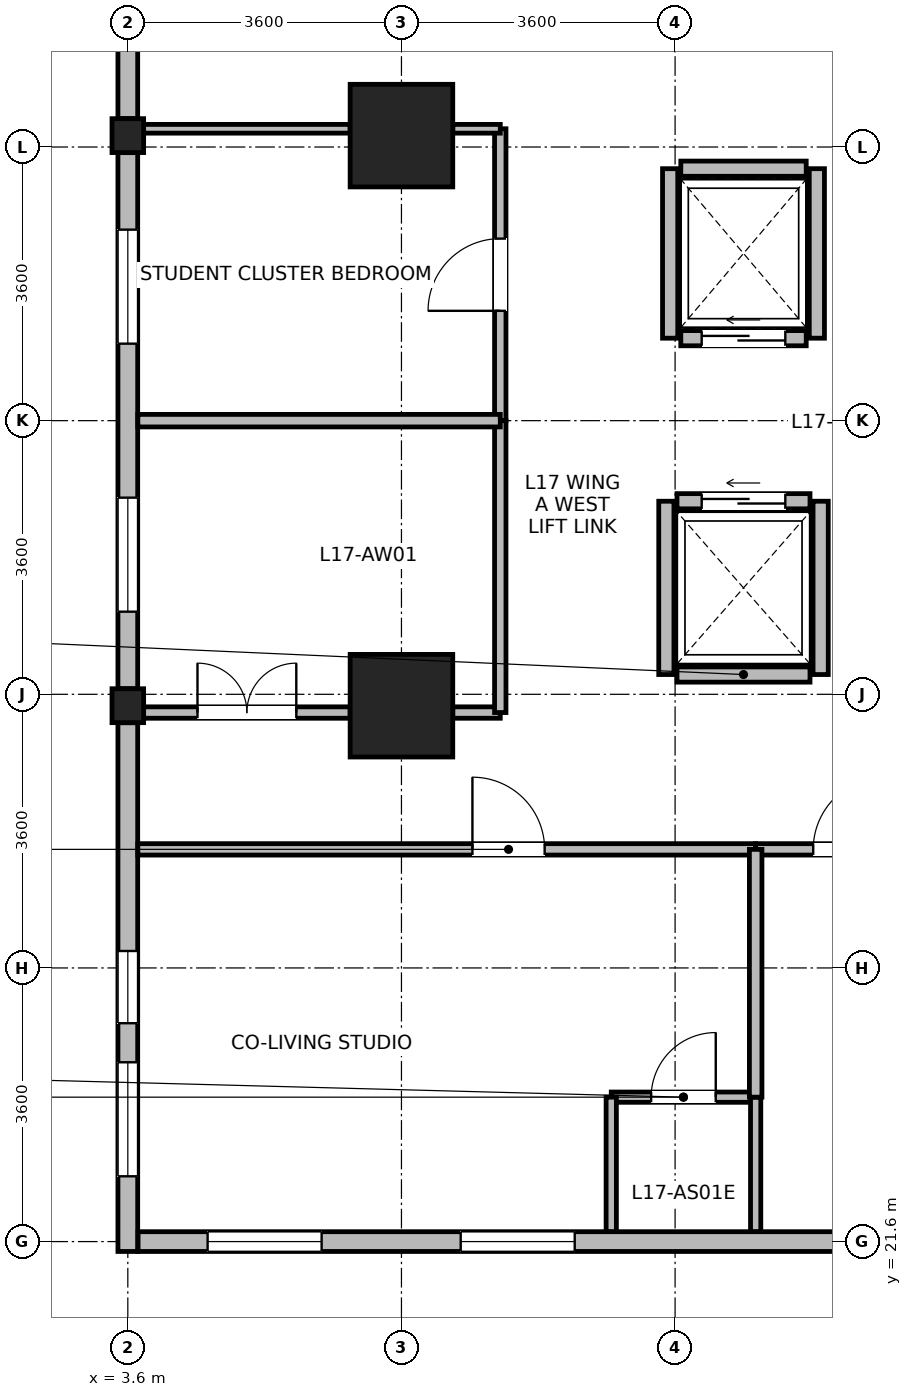
"""IFC4 building model, lengths in metres.
Left out: names, types, materials, properties, quantities, classifications, styles, units other than length and angle.
Written with IfcOpenShell. Run it as: python <this file> out.ifc"""

import sys

from ifc_helpers import new_model, si_unit, direction, frame, frame_2d, origin, origin_2d, place, context, subcontext, project, spatial, rectangle, i_section, extrude, source, transform, mapped, element, fill, save


model = new_model("IFC4")
c1 = context("Model", 3, precision=1e-05, world=origin(), true_north=direction((0.0, 1.0)))
c2 = subcontext(c1, "Body", "Model", "MODEL_VIEW")
j1 = project(units=[si_unit("LENGTHUNIT", "METRE"), si_unit("PLANEANGLEUNIT", "RADIAN")], contexts=[c1])
p1 = place(None, origin())
s1 = spatial("IfcSite", under=j1, at=p1, CompositionType="ELEMENT")
p2 = place(p1, origin())
s2 = spatial("IfcBuilding", under=s1, at=p2, CompositionType="ELEMENT")
p3 = place(p2, frame((0.0, 0.0, 69.7)))
s3 = spatial("IfcBuildingStorey", under=s2, at=p3, CompositionType="ELEMENT", Elevation=69.7)
m1 = source(origin(), c2, "Body", "SweptSolid", [
    extrude(rectangle(XDim=1.35, YDim=1.35, at=origin_2d()), origin(), (0.0, 0.0, 1.0), 3.7),
])
for number, where, z_axis, x_axis in (
    (1, (7.2, 28.65, 0.0), (0.0, 0.0, 1.0), (1.0, 0.0, 0.0)),
    (2, (7.2, 36.15, 0.0), (0.0, 0.0, 1.0), (1.0, 0.0, 0.0)),
):
    element("IfcColumn", number, at=place(p3, frame(where, z_axis=z_axis, x_axis=x_axis)), inside=s3, PredefinedType="COLUMN", context=c2, shape_type="MappedRepresentation", body=[
        mapped(m1, transform((0.0, 0.0, 0.0), x_axis=(1.0, 0.0, 0.0), y_axis=(0.0, 1.0, 0.0), z_axis=(0.0, 0.0, 1.0), scale=1.0)),
    ])
m2 = source(origin(), c2, "Body", "SweptSolid", [
    extrude(i_section(OverallWidth=0.416, OverallDepth=0.446, WebThickness=0.029, FlangeThickness=0.04, FilletRadius=0.015, at=origin_2d()), origin(), (0.0, 0.0, 1.0), 3.7),
])
for number, where, z_axis, x_axis in (
    (3, (3.6, 28.65, 0.0), (0.0, 0.0, 1.0), (1.0, 0.0, 0.0)),
    (4, (3.6, 36.15, 0.0), (0.0, 0.0, 1.0), (1.0, 0.0, 0.0)),
):
    element("IfcColumn", number, at=place(p3, frame(where, z_axis=z_axis, x_axis=x_axis)), inside=s3, PredefinedType="COLUMN", context=c2, shape_type="MappedRepresentation", body=[
        mapped(m2, transform((0.0, 0.0, 0.0), x_axis=(1.0, 0.0, 0.0), y_axis=(0.0, 1.0, 0.0), z_axis=(0.0, 0.0, 1.0), scale=1.0)),
    ])
p4 = place(p3, frame((3.6, 36.374, 0.0), z_axis=(0.0, 0.0, 1.0), x_axis=(0.0, 1.0, 0.0)))
e5 = element("IfcWall", 5, at=p4, inside=s3, PredefinedType="STANDARD", context=c2, shape_type="SweptSolid", body=[
    extrude(rectangle(XDim=3.356, YDim=0.26, at=frame_2d((1.678, 0.0))), origin(), (0.0, 0.0, 1.0), 3.32),
])
p5 = place(p4, frame((0.928, 0.0, 0.85)))
e6 = element("IfcOpeningElement", 6, at=p5, cuts=e5, PredefinedType="OPENING", context=c2, shape_type="SweptSolid", body=[
    extrude(rectangle(XDim=1.5, YDim=1.85, at=frame_2d((0.75, 0.925))), frame((0.0, 0.14, 0.0), z_axis=(0.0, -1.0, 0.0), x_axis=(1.0, 0.0, 0.0)), (0.0, 0.0, 1.0), 0.28),
])
p6 = place(p3, frame((3.6, 28.874, 0.0), z_axis=(0.0, 0.0, 1.0), x_axis=(0.0, 1.0, 0.0)))
e7 = element("IfcWall", 7, at=p6, inside=s3, PredefinedType="STANDARD", context=c2, shape_type="SweptSolid", body=[
    extrude(rectangle(XDim=7.052, YDim=0.26, at=frame_2d((3.526, 0.0))), origin(), (0.0, 0.0, 1.0), 2.82),
])
p7 = place(p6, frame((1.013, 0.0, 0.85)))
e8 = element("IfcOpeningElement", 8, at=p7, cuts=e7, PredefinedType="OPENING", context=c2, shape_type="SweptSolid", body=[
    extrude(rectangle(XDim=1.5, YDim=1.85, at=frame_2d((0.75, 0.925))), frame((0.0, 0.14, 0.0), z_axis=(0.0, -1.0, 0.0), x_axis=(1.0, 0.0, 0.0)), (0.0, 0.0, 1.0), 0.28),
])
p8 = place(p6, frame((4.539, 0.0, 0.85)))
e9 = element("IfcOpeningElement", 9, at=p8, cuts=e7, PredefinedType="OPENING", context=c2, shape_type="SweptSolid", body=[
    extrude(rectangle(XDim=1.5, YDim=1.85, at=frame_2d((0.75, 0.925))), frame((0.0, 0.14, 0.0), z_axis=(0.0, -1.0, 0.0), x_axis=(1.0, 0.0, 0.0)), (0.0, 0.0, 1.0), 0.28),
])
p9 = place(p3, frame((3.6, 21.47, 0.0), z_axis=(0.0, 0.0, 1.0), x_axis=(0.0, 1.0, 0.0)))
e10 = element("IfcWall", 10, at=p9, inside=s3, PredefinedType="STANDARD", context=c2, shape_type="SweptSolid", body=[
    extrude(rectangle(XDim=6.956, YDim=0.26, at=frame_2d((3.478, 0.0))), origin(), (0.0, 0.0, 1.0), 3.32),
])
p10 = place(p9, frame((0.989, 0.0, 0.85)))
e11 = element("IfcOpeningElement", 11, at=p10, cuts=e10, PredefinedType="OPENING", context=c2, shape_type="SweptSolid", body=[
    extrude(rectangle(XDim=1.5, YDim=1.85, at=frame_2d((0.75, 0.925))), frame((0.0, 0.14, 0.0), z_axis=(0.0, -1.0, 0.0), x_axis=(1.0, 0.0, 0.0)), (0.0, 0.0, 1.0), 0.28),
])
p11 = place(p9, frame((3.003, 0.0, 0.85)))
e12 = element("IfcOpeningElement", 12, at=p11, cuts=e10, PredefinedType="OPENING", context=c2, shape_type="SweptSolid", body=[
    extrude(rectangle(XDim=0.95, YDim=1.75, at=frame_2d((0.475, 0.875))), frame((0.0, 0.14, 0.0), z_axis=(0.0, -1.0, 0.0), x_axis=(1.0, 0.0, 0.0)), (0.0, 0.0, 1.0), 0.28),
])
p12 = place(p3, frame((13.724, 21.6, 0.0), z_axis=(0.0, 0.0, 1.0), x_axis=(-1.0, 0.0, 0.0)))
e13 = element("IfcWall", 13, at=p12, inside=s3, PredefinedType="STANDARD", context=c2, shape_type="SweptSolid", body=[
    extrude(rectangle(XDim=9.989, YDim=0.26, at=frame_2d((4.995, 0.0))), origin(), (0.0, 0.0, 1.0), 3.32),
])
p13 = place(p12, frame((4.244, 0.0, 0.85)))
e14 = element("IfcOpeningElement", 14, at=p13, cuts=e13, PredefinedType="OPENING", context=c2, shape_type="SweptSolid", body=[
    extrude(rectangle(XDim=1.5, YDim=1.85, at=frame_2d((0.75, 0.925))), frame((0.0, 0.14, 0.0), z_axis=(0.0, -1.0, 0.0), x_axis=(1.0, 0.0, 0.0)), (0.0, 0.0, 1.0), 0.28),
])
p14 = place(p12, frame((7.574, 0.0, 0.85)))
e15 = element("IfcOpeningElement", 15, at=p14, cuts=e13, PredefinedType="OPENING", context=c2, shape_type="SweptSolid", body=[
    extrude(rectangle(XDim=1.5, YDim=1.85, at=frame_2d((0.75, 0.925))), frame((0.0, 0.14, 0.0), z_axis=(0.0, -1.0, 0.0), x_axis=(1.0, 0.0, 0.0)), (0.0, 0.0, 1.0), 0.28),
])
p15 = place(p3, frame((10.825, 29.06, 0.0), z_axis=(0.0, 0.0, 1.0), x_axis=(1.0, 0.0, 0.0)))
e16 = element("IfcWall", 16, at=p15, inside=s3, PredefinedType="PARTITIONING", context=c2, shape_type="SweptSolid", body=[
    extrude(rectangle(XDim=1.75, YDim=0.2, at=frame_2d((0.875, 0.0))), origin(), (0.0, 0.0, 1.0), 3.32),
])
p16 = place(p3, frame((10.825, 31.34, 0.0), z_axis=(0.0, 0.0, 1.0), x_axis=(1.0, 0.0, 0.0)))
e17 = element("IfcWall", 17, at=p16, inside=s3, PredefinedType="PARTITIONING", context=c2, shape_type="SweptSolid", body=[
    extrude(rectangle(XDim=1.75, YDim=0.2, at=frame_2d((0.875, 0.0))), origin(), (0.0, 0.0, 1.0), 3.32),
])
p17 = place(p16, frame((0.325, 0.0, 0.0)))
e18 = element("IfcOpeningElement", 18, at=p17, cuts=e17, PredefinedType="OPENING", context=c2, shape_type="SweptSolid", body=[
    extrude(rectangle(XDim=1.1, YDim=2.12, at=frame_2d((0.55, 1.06))), frame((0.0, 0.11, 0.0), z_axis=(0.0, -1.0, 0.0), x_axis=(1.0, 0.0, 0.0)), (0.0, 0.0, 1.0), 0.22),
])
for number, where, z_axis, x_axis in (
    (19, (10.685, 29.06, 0.0), (0.0, 0.0, 1.0), (0.0, 1.0, 0.0)),
    (20, (12.715, 29.06, 0.0), (0.0, 0.0, 1.0), (0.0, 1.0, 0.0)),
):
    element("IfcWall", number, at=place(p3, frame(where, z_axis=z_axis, x_axis=x_axis)), inside=s3, PredefinedType="PARTITIONING", context=c2, shape_type="SweptSolid", body=[
        extrude(rectangle(XDim=2.28, YDim=0.2, at=frame_2d((1.14, 0.0))), origin(), (0.0, 0.0, 1.0), 3.32),
    ])
p18 = place(p3, frame((10.875, 33.485, 0.0), z_axis=(0.0, 0.0, 1.0), x_axis=(1.0, 0.0, 0.0)))
e21 = element("IfcWall", 21, at=p18, inside=s3, PredefinedType="PARTITIONING", context=c2, shape_type="SweptSolid", body=[
    extrude(rectangle(XDim=1.65, YDim=0.2, at=frame_2d((0.825, 0.0))), origin(), (0.0, 0.0, 1.0), 3.32),
])
p19 = place(p18, frame((0.275, 0.0, 0.0)))
e22 = element("IfcOpeningElement", 22, at=p19, cuts=e21, PredefinedType="OPENING", context=c2, shape_type="SweptSolid", body=[
    extrude(rectangle(XDim=1.1, YDim=2.12, at=frame_2d((0.55, 1.06))), frame((0.0, 0.11, 0.0), z_axis=(0.0, -1.0, 0.0), x_axis=(1.0, 0.0, 0.0)), (0.0, 0.0, 1.0), 0.22),
])
p20 = place(p3, frame((10.875, 35.715, 0.0), z_axis=(0.0, 0.0, 1.0), x_axis=(1.0, 0.0, 0.0)))
e23 = element("IfcWall", 23, at=p20, inside=s3, PredefinedType="PARTITIONING", context=c2, shape_type="SweptSolid", body=[
    extrude(rectangle(XDim=1.65, YDim=0.2, at=frame_2d((0.825, 0.0))), origin(), (0.0, 0.0, 1.0), 3.32),
])
for number, where, z_axis, x_axis in (
    (24, (10.735, 33.485, 0.0), (0.0, 0.0, 1.0), (0.0, 1.0, 0.0)),
    (25, (12.665, 33.485, 0.0), (0.0, 0.0, 1.0), (0.0, 1.0, 0.0)),
):
    element("IfcWall", number, at=place(p3, frame(where, z_axis=z_axis, x_axis=x_axis)), inside=s3, PredefinedType="PARTITIONING", context=c2, shape_type="SweptSolid", body=[
        extrude(rectangle(XDim=2.23, YDim=0.2, at=frame_2d((1.115, 0.0))), origin(), (0.0, 0.0, 1.0), 3.32),
    ])
p21 = place(p3, frame((9.96, 23.5, 0.0), z_axis=(0.0, 0.0, 1.0), x_axis=(1.0, 0.0, 0.0)))
e26 = element("IfcWall", 26, at=p21, inside=s3, PredefinedType="PARTITIONING", context=c2, shape_type="SweptSolid", body=[
    extrude(rectangle(XDim=1.9, YDim=0.135, at=frame_2d((0.95, 0.0))), origin(), (0.0, 0.0, 1.0), 3.32),
])
p22 = place(p21, frame((0.525, 0.0, 0.0)))
e27 = element("IfcOpeningElement", 27, at=p22, cuts=e26, PredefinedType="OPENING", context=c2, shape_type="SweptSolid", body=[
    extrude(rectangle(XDim=0.85, YDim=2.04, at=frame_2d((0.425, 1.02))), frame((0.0, 0.078, 0.0), z_axis=(0.0, -1.0, 0.0), x_axis=(1.0, 0.0, 0.0)), (0.0, 0.0, 1.0), 0.155),
])
for number, where, z_axis, x_axis in (
    (28, (9.96, 21.732, 0.0), (0.0, 0.0, 1.0), (0.0, 1.0, 0.0)),
    (29, (11.86, 21.732, 0.0), (0.0, 0.0, 1.0), (0.0, 1.0, 0.0)),
):
    element("IfcWall", number, at=place(p3, frame(where, z_axis=z_axis, x_axis=x_axis)), inside=s3, PredefinedType="PARTITIONING", context=c2, shape_type="SweptSolid", body=[
        extrude(rectangle(XDim=1.768, YDim=0.135, at=frame_2d((0.884, 0.0))), origin(), (0.0, 0.0, 1.0), 3.32),
    ])
p23 = place(p3, frame((3.732, 26.76, 0.0), z_axis=(0.0, 0.0, 1.0), x_axis=(1.0, 0.0, 0.0)))
e30 = element("IfcWall", 30, at=p23, inside=s3, PredefinedType="PARTITIONING", context=c2, shape_type="SweptSolid", body=[
    extrude(rectangle(XDim=8.128, YDim=0.15, at=frame_2d((4.064, 0.0))), origin(), (0.0, 0.0, 1.0), 3.32),
])
p24 = place(p23, frame((4.402, 0.0, 0.0)))
e31 = element("IfcOpeningElement", 31, at=p24, cuts=e30, PredefinedType="OPENING", context=c2, shape_type="SweptSolid", body=[
    extrude(rectangle(XDim=0.95, YDim=2.1, at=frame_2d((0.475, 1.05))), frame((0.0, 0.085, 0.0), z_axis=(0.0, -1.0, 0.0), x_axis=(1.0, 0.0, 0.0)), (0.0, 0.0, 1.0), 0.17),
])
p25 = place(p3, frame((11.86, 26.76, 0.0), z_axis=(0.0, 0.0, 1.0), x_axis=(1.0, 0.0, 0.0)))
e32 = element("IfcWall", 32, at=p25, inside=s3, PredefinedType="PARTITIONING", context=c2, shape_type="SweptSolid", body=[
    extrude(rectangle(XDim=5.6, YDim=0.15, at=frame_2d((2.8, 0.0))), origin(), (0.0, 0.0, 1.0), 3.32),
])
p26 = place(p25, frame((0.757, 0.0, 0.0)))
e33 = element("IfcOpeningElement", 33, at=p26, cuts=e32, PredefinedType="OPENING", context=c2, shape_type="SweptSolid", body=[
    extrude(rectangle(XDim=0.95, YDim=2.1, at=frame_2d((0.475, 1.05))), frame((0.0, 0.085, 0.0), z_axis=(0.0, -1.0, 0.0), x_axis=(1.0, 0.0, 0.0)), (0.0, 0.0, 1.0), 0.17),
])
p27 = place(p3, frame((3.808, 28.56, 0.0), z_axis=(0.0, 0.0, 1.0), x_axis=(1.0, 0.0, 0.0)))
e34 = element("IfcWall", 34, at=p27, inside=s3, PredefinedType="PARTITIONING", context=c2, shape_type="SweptSolid", body=[
    extrude(rectangle(XDim=2.717, YDim=0.15, at=frame_2d((1.358, 0.0))), origin(), (0.0, 0.0, 1.0), 2.67),
])
p28 = place(p27, frame((0.708, 0.0, 0.0)))
e35 = element("IfcOpeningElement", 35, at=p28, cuts=e34, PredefinedType="OPENING", context=c2, shape_type="SweptSolid", body=[
    extrude(rectangle(XDim=1.3, YDim=2.12, at=frame_2d((0.65, 1.06))), frame((0.0, 0.085, 0.0), z_axis=(0.0, -1.0, 0.0), x_axis=(1.0, 0.0, 0.0)), (0.0, 0.0, 1.0), 0.17),
])
p29 = place(p3, frame((7.875, 28.56, 0.0), z_axis=(0.0, 0.0, 1.0), x_axis=(1.0, 0.0, 0.0)))
e36 = element("IfcWall", 36, at=p29, inside=s3, PredefinedType="PARTITIONING", context=c2, shape_type="SweptSolid", body=[
    extrude(rectangle(XDim=0.625, YDim=0.15, at=frame_2d((0.312, 0.0))), origin(), (0.0, 0.0, 1.0), 2.67),
])
p30 = place(p3, frame((8.5, 32.4, 0.0), z_axis=(0.0, 0.0, 1.0), x_axis=(0.0, 1.0, 0.0)))
e37 = element("IfcWall", 37, at=p30, inside=s3, PredefinedType="PARTITIONING", context=c2, shape_type="SweptSolid", body=[
    extrude(rectangle(XDim=3.84, YDim=0.15, at=frame_2d((1.92, 0.0))), origin(), (0.0, 0.0, 1.0), 3.32),
])
p31 = place(p30, frame((1.445, 0.0, 0.0)))
e38 = element("IfcOpeningElement", 38, at=p31, cuts=e37, PredefinedType="OPENING", context=c2, shape_type="SweptSolid", body=[
    extrude(rectangle(XDim=0.95, YDim=2.1, at=frame_2d((0.475, 1.05))), frame((0.0, 0.085, 0.0), z_axis=(0.0, -1.0, 0.0), x_axis=(1.0, 0.0, 0.0)), (0.0, 0.0, 1.0), 0.17),
])
p32 = place(p3, frame((8.5, 28.56, 0.0), z_axis=(0.0, 0.0, 1.0), x_axis=(0.0, 1.0, 0.0)))
e39 = element("IfcWall", 39, at=p32, inside=s3, PredefinedType="PARTITIONING", context=c2, shape_type="SweptSolid", body=[
    extrude(rectangle(XDim=3.84, YDim=0.15, at=frame_2d((1.92, 0.0))), origin(), (0.0, 0.0, 1.0), 3.32),
])
p33 = place(p3, frame((3.732, 32.4, 0.0), z_axis=(0.0, 0.0, 1.0), x_axis=(1.0, 0.0, 0.0)))
e40 = element("IfcWall", 40, at=p33, inside=s3, PredefinedType="PARTITIONING", context=c2, shape_type="SweptSolid", body=[
    extrude(rectangle(XDim=4.768, YDim=0.165, at=frame_2d((2.384, 0.0))), origin(), (0.0, 0.0, 1.0), 3.32),
])
p34 = place(p3, frame((3.808, 36.24, 0.0), z_axis=(0.0, 0.0, 1.0), x_axis=(1.0, 0.0, 0.0)))
e41 = element("IfcWall", 41, at=p34, inside=s3, PredefinedType="PARTITIONING", context=c2, shape_type="SweptSolid", body=[
    extrude(rectangle(XDim=2.717, YDim=0.115, at=frame_2d((1.358, 0.0))), origin(), (0.0, 0.0, 1.0), 2.67),
])
p35 = place(p3, frame((7.875, 36.24, 0.0), z_axis=(0.0, 0.0, 1.0), x_axis=(1.0, 0.0, 0.0)))
e42 = element("IfcWall", 42, at=p35, inside=s3, PredefinedType="PARTITIONING", context=c2, shape_type="SweptSolid", body=[
    extrude(rectangle(XDim=0.625, YDim=0.115, at=frame_2d((0.312, 0.0))), origin(), (0.0, 0.0, 1.0), 2.67),
])
p36 = place(p3, frame((11.86, 23.5, 0.0), z_axis=(0.0, 0.0, 1.0), x_axis=(0.0, 1.0, 0.0)))
e43 = element("IfcWall", 43, at=p36, inside=s3, PredefinedType="PARTITIONING", context=c2, shape_type="SweptSolid", body=[
    extrude(rectangle(XDim=3.26, YDim=0.165, at=frame_2d((1.63, 0.0))), origin(), (0.0, 0.0, 1.0), 3.32),
])
p37 = place(p7, origin())
e44 = element("IfcWindow", 44, at=p37, inside=s3, PartitioningType="SINGLE_PANEL", PredefinedType="WINDOW", context=c2, shape_type="SweptSolid", body=[
    extrude(rectangle(XDim=1.5, YDim=1.85, at=frame_2d((0.75, 0.925))), frame((0.0, 0.03, 0.0), z_axis=(0.0, -1.0, 0.0), x_axis=(1.0, 0.0, 0.0)), (0.0, 0.0, 1.0), 0.06),
])
fill(e8, e44)
p38 = place(p8, origin())
e45 = element("IfcWindow", 45, at=p38, inside=s3, PartitioningType="SINGLE_PANEL", PredefinedType="WINDOW", context=c2, shape_type="SweptSolid", body=[
    extrude(rectangle(XDim=1.5, YDim=1.85, at=frame_2d((0.75, 0.925))), frame((0.0, 0.03, 0.0), z_axis=(0.0, -1.0, 0.0), x_axis=(1.0, 0.0, 0.0)), (0.0, 0.0, 1.0), 0.06),
])
fill(e9, e45)
p39 = place(p10, origin())
e46 = element("IfcWindow", 46, at=p39, inside=s3, PartitioningType="SINGLE_PANEL", PredefinedType="WINDOW", context=c2, shape_type="SweptSolid", body=[
    extrude(rectangle(XDim=1.5, YDim=1.85, at=frame_2d((0.75, 0.925))), frame((0.0, 0.03, 0.0), z_axis=(0.0, -1.0, 0.0), x_axis=(1.0, 0.0, 0.0)), (0.0, 0.0, 1.0), 0.06),
])
fill(e11, e46)
p40 = place(p11, origin())
e47 = element("IfcWindow", 47, at=p40, inside=s3, PartitioningType="SINGLE_PANEL", PredefinedType="WINDOW", context=c2, shape_type="SweptSolid", body=[
    extrude(rectangle(XDim=0.95, YDim=1.75, at=frame_2d((0.475, 0.875))), frame((0.0, 0.03, 0.0), z_axis=(0.0, -1.0, 0.0), x_axis=(1.0, 0.0, 0.0)), (0.0, 0.0, 1.0), 0.06),
])
fill(e12, e47)
p41 = place(p13, origin())
e48 = element("IfcWindow", 48, at=p41, inside=s3, PartitioningType="SINGLE_PANEL", PredefinedType="WINDOW", context=c2, shape_type="SweptSolid", body=[
    extrude(rectangle(XDim=1.5, YDim=1.85, at=frame_2d((0.75, 0.925))), frame((0.0, 0.03, 0.0), z_axis=(0.0, -1.0, 0.0), x_axis=(1.0, 0.0, 0.0)), (0.0, 0.0, 1.0), 0.06),
])
fill(e14, e48)
p42 = place(p14, origin())
e49 = element("IfcWindow", 49, at=p42, inside=s3, PartitioningType="SINGLE_PANEL", PredefinedType="WINDOW", context=c2, shape_type="SweptSolid", body=[
    extrude(rectangle(XDim=1.5, YDim=1.85, at=frame_2d((0.75, 0.925))), frame((0.0, 0.03, 0.0), z_axis=(0.0, -1.0, 0.0), x_axis=(1.0, 0.0, 0.0)), (0.0, 0.0, 1.0), 0.06),
])
fill(e15, e49)
p43 = place(p17, origin())
e50 = element("IfcDoor", 50, at=p43, inside=s3, OperationType="SLIDING_TO_LEFT", PredefinedType="DOOR", context=c2, shape_type="SweptSolid", body=[
    extrude(rectangle(XDim=1.1, YDim=2.12, at=frame_2d((0.55, 1.06))), frame((0.0, 0.025, 0.0), z_axis=(0.0, -1.0, 0.0), x_axis=(1.0, 0.0, 0.0)), (0.0, 0.0, 1.0), 0.05),
])
fill(e18, e50)
p44 = place(p19, origin())
e51 = element("IfcDoor", 51, at=p44, inside=s3, OperationType="SLIDING_TO_LEFT", PredefinedType="DOOR", context=c2, shape_type="SweptSolid", body=[
    extrude(rectangle(XDim=1.1, YDim=2.12, at=frame_2d((0.55, 1.06))), frame((0.0, 0.025, 0.0), z_axis=(0.0, -1.0, 0.0), x_axis=(1.0, 0.0, 0.0)), (0.0, 0.0, 1.0), 0.05),
])
fill(e22, e51)
p45 = place(p22, origin())
e52 = element("IfcDoor", 52, at=p45, inside=s3, OperationType="SINGLE_SWING_RIGHT", PredefinedType="DOOR", context=c2, shape_type="SweptSolid", body=[
    extrude(rectangle(XDim=0.85, YDim=2.04, at=frame_2d((0.425, 1.02))), frame((0.0, 0.025, 0.0), z_axis=(0.0, -1.0, 0.0), x_axis=(1.0, 0.0, 0.0)), (0.0, 0.0, 1.0), 0.05),
])
fill(e27, e52)
p46 = place(p24, origin())
e53 = element("IfcDoor", 53, at=p46, inside=s3, OperationType="SINGLE_SWING_LEFT", PredefinedType="DOOR", context=c2, shape_type="SweptSolid", body=[
    extrude(rectangle(XDim=0.95, YDim=2.1, at=frame_2d((0.475, 1.05))), frame((0.0, 0.025, 0.0), z_axis=(0.0, -1.0, 0.0), x_axis=(1.0, 0.0, 0.0)), (0.0, 0.0, 1.0), 0.05),
])
fill(e31, e53)
p47 = place(p26, origin())
e54 = element("IfcDoor", 54, at=p47, inside=s3, OperationType="SINGLE_SWING_RIGHT", PredefinedType="DOOR", context=c2, shape_type="SweptSolid", body=[
    extrude(rectangle(XDim=0.95, YDim=2.1, at=frame_2d((0.475, 1.05))), frame((0.0, 0.025, 0.0), z_axis=(0.0, -1.0, 0.0), x_axis=(1.0, 0.0, 0.0)), (0.0, 0.0, 1.0), 0.05),
])
fill(e33, e54)
p48 = place(p28, origin())
e55 = element("IfcDoor", 55, at=p48, inside=s3, OperationType="DOUBLE_DOOR_SINGLE_SWING", PredefinedType="DOOR", context=c2, shape_type="SweptSolid", body=[
    extrude(rectangle(XDim=1.3, YDim=2.12, at=frame_2d((0.65, 1.06))), frame((0.0, 0.025, 0.0), z_axis=(0.0, -1.0, 0.0), x_axis=(1.0, 0.0, 0.0)), (0.0, 0.0, 1.0), 0.05),
])
fill(e35, e55)
p49 = place(p31, origin())
e56 = element("IfcDoor", 56, at=p49, inside=s3, OperationType="SINGLE_SWING_LEFT", PredefinedType="DOOR", context=c2, shape_type="SweptSolid", body=[
    extrude(rectangle(XDim=0.95, YDim=2.1, at=frame_2d((0.475, 1.05))), frame((0.0, 0.025, 0.0), z_axis=(0.0, -1.0, 0.0), x_axis=(1.0, 0.0, 0.0)), (0.0, 0.0, 1.0), 0.05),
])
fill(e38, e56)
save(model, sys.argv[1])
